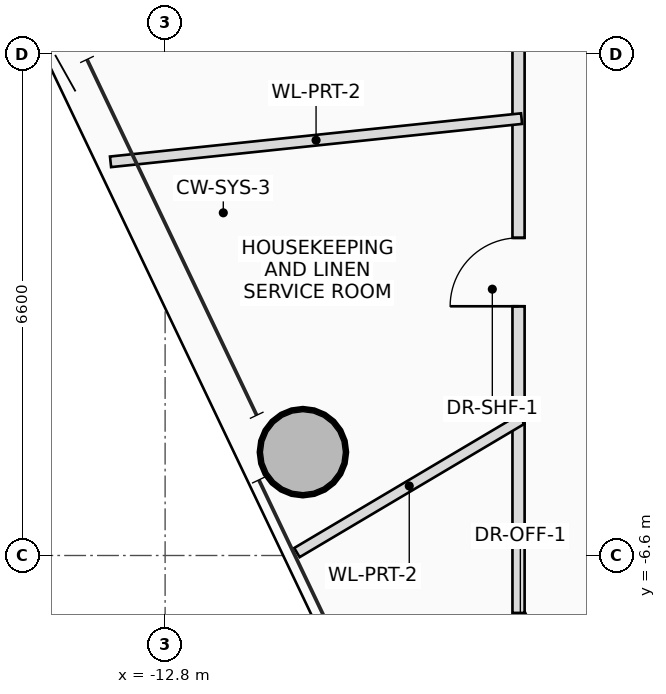
"""IFC4 building model, lengths in metres.
Left out: names, types, materials, properties, quantities, classifications, styles, units other than length and angle.
Written with IfcOpenShell. Run it as: python <this file> out.ifc"""

import sys

from ifc_helpers import new_model, si_unit, direction, frame, frame_2d, origin, origin_2d, place, context, subcontext, project, spatial, rectangle, hollow_circle, extrude, source, transform, mapped, element, fill, save


model = new_model("IFC4")
c1 = context("Model", 3, precision=1e-05, world=origin(), true_north=direction((0.0, 1.0)))
c2 = subcontext(c1, "Body", "Model", "MODEL_VIEW")
j1 = project(units=[si_unit("LENGTHUNIT", "METRE"), si_unit("PLANEANGLEUNIT", "RADIAN")], contexts=[c1])
p1 = place(None, origin())
s1 = spatial("IfcSite", under=j1, at=p1, CompositionType="ELEMENT")
p2 = place(p1, origin())
s2 = spatial("IfcBuilding", under=s1, at=p2, CompositionType="ELEMENT")
p3 = place(p2, frame((0.0, 0.0, 215.6)))
s3 = spatial("IfcBuildingStorey", under=s2, at=p3, CompositionType="ELEMENT", Elevation=215.6)
m1 = source(origin(), c2, "Body", "SweptSolid", [
    extrude(hollow_circle(Radius=0.575, WallThickness=0.042, at=origin_2d()), origin(), (0.0, 0.0, 1.0), 3.45),
])
p4 = place(p3, frame((-10.987, -5.24, 0.0), z_axis=(0.0, 0.0, 1.0), x_axis=(1.0, 0.0, 0.0)))
e1 = element("IfcColumn", 1, at=p4, inside=s3, PredefinedType="COLUMN", context=c2, shape_type="MappedRepresentation", body=[
    mapped(m1, transform((0.0, 0.0, 0.0), scale=1.0)),
])
p5 = place(p3, frame((-6.36, -11.108, 0.0), z_axis=(0.0, 0.0, 1.0), x_axis=(-0.430460013629, 0.902609648002, 0.0)))
e2 = element("IfcWall", 2, at=p5, inside=s3, PredefinedType="PARTITIONING", context=c2, shape_type="SweptSolid", body=[
    extrude(rectangle(XDim=4.158, YDim=0.16, at=frame_2d((2.079, 0.0))), origin(), (0.0, 0.0, 1.0), 2.565),
])
p6 = place(p5, frame((2.577, 0.0, 0.0)))
e3 = element("IfcOpeningElement", 3, at=p6, cuts=e2, PredefinedType="OPENING", context=c2, shape_type="SweptSolid", body=[
    extrude(rectangle(XDim=1.0, YDim=2.25, at=frame_2d((0.5, 1.125))), frame((0.0, 0.09, 0.0), z_axis=(0.0, -1.0, 0.0), x_axis=(1.0, 0.0, 0.0)), (0.0, 0.0, 1.0), 0.18),
])
p7 = place(p3, frame((-8.15, -7.355, 0.0), z_axis=(0.0, 0.0, 1.0), x_axis=(0.0, 1.0, 0.0)))
e4 = element("IfcWall", 4, at=p7, inside=s3, PredefinedType="PARTITIONING", context=c2, shape_type="SweptSolid", body=[
    extrude(rectangle(XDim=14.956, YDim=0.16, at=frame_2d((7.478, 0.0))), origin(), (0.0, 0.0, 1.0), 2.565),
])
p8 = place(p7, frame((4.034, 0.0, 0.0)))
e5 = element("IfcOpeningElement", 5, at=p8, cuts=e4, PredefinedType="OPENING", context=c2, shape_type="SweptSolid", body=[
    extrude(rectangle(XDim=0.9, YDim=2.05, at=frame_2d((0.45, 1.025))), frame((0.0, 0.09, 0.0), z_axis=(0.0, -1.0, 0.0), x_axis=(1.0, 0.0, 0.0)), (0.0, 0.0, 1.0), 0.18),
])
p9 = place(p7, frame((10.129, 0.0, 0.0)))
e6 = element("IfcOpeningElement", 6, at=p9, cuts=e4, PredefinedType="OPENING", context=c2, shape_type="SweptSolid", body=[
    extrude(rectangle(XDim=1.0, YDim=2.25, at=frame_2d((0.5, 1.125))), frame((0.0, 0.09, 0.0), z_axis=(0.0, -1.0, 0.0), x_axis=(1.0, 0.0, 0.0)), (0.0, 0.0, 1.0), 0.18),
])
p10 = place(p3, frame((-8.11, -0.852, 0.0), z_axis=(0.0, 0.0, 1.0), x_axis=(-0.994517501458, -0.104570260086, 0.0)))
e7 = element("IfcWall", 7, at=p10, inside=s3, PredefinedType="PARTITIONING", context=c2, shape_type="SweptSolid", body=[
    extrude(rectangle(XDim=5.438, YDim=0.14, at=frame_2d((2.719, 0.0))), origin(), (0.0, 0.0, 1.0), 2.725),
])
p11 = place(p3, frame((-8.11, -4.809, 0.0), z_axis=(0.0, 0.0, 1.0), x_axis=(-0.860151862046, -0.510038012524, 0.0)))
e8 = element("IfcWall", 8, at=p11, inside=s3, PredefinedType="PARTITIONING", context=c2, shape_type="SweptSolid", body=[
    extrude(rectangle(XDim=3.436, YDim=0.14, at=frame_2d((1.718, 0.0))), origin(), (0.0, 0.0, 1.0), 2.565),
])
p12 = place(p8, origin())
e9 = element("IfcDoor", 9, at=p12, inside=s3, OperationType="SINGLE_SWING_LEFT", PredefinedType="DOOR", context=c2, shape_type="SweptSolid", body=[
    extrude(rectangle(XDim=0.9, YDim=2.05, at=frame_2d((0.45, 1.025))), frame((0.0, 0.025, 0.0), z_axis=(0.0, -1.0, 0.0), x_axis=(1.0, 0.0, 0.0)), (0.0, 0.0, 1.0), 0.05),
])
fill(e5, e9)
save(model, sys.argv[1])
